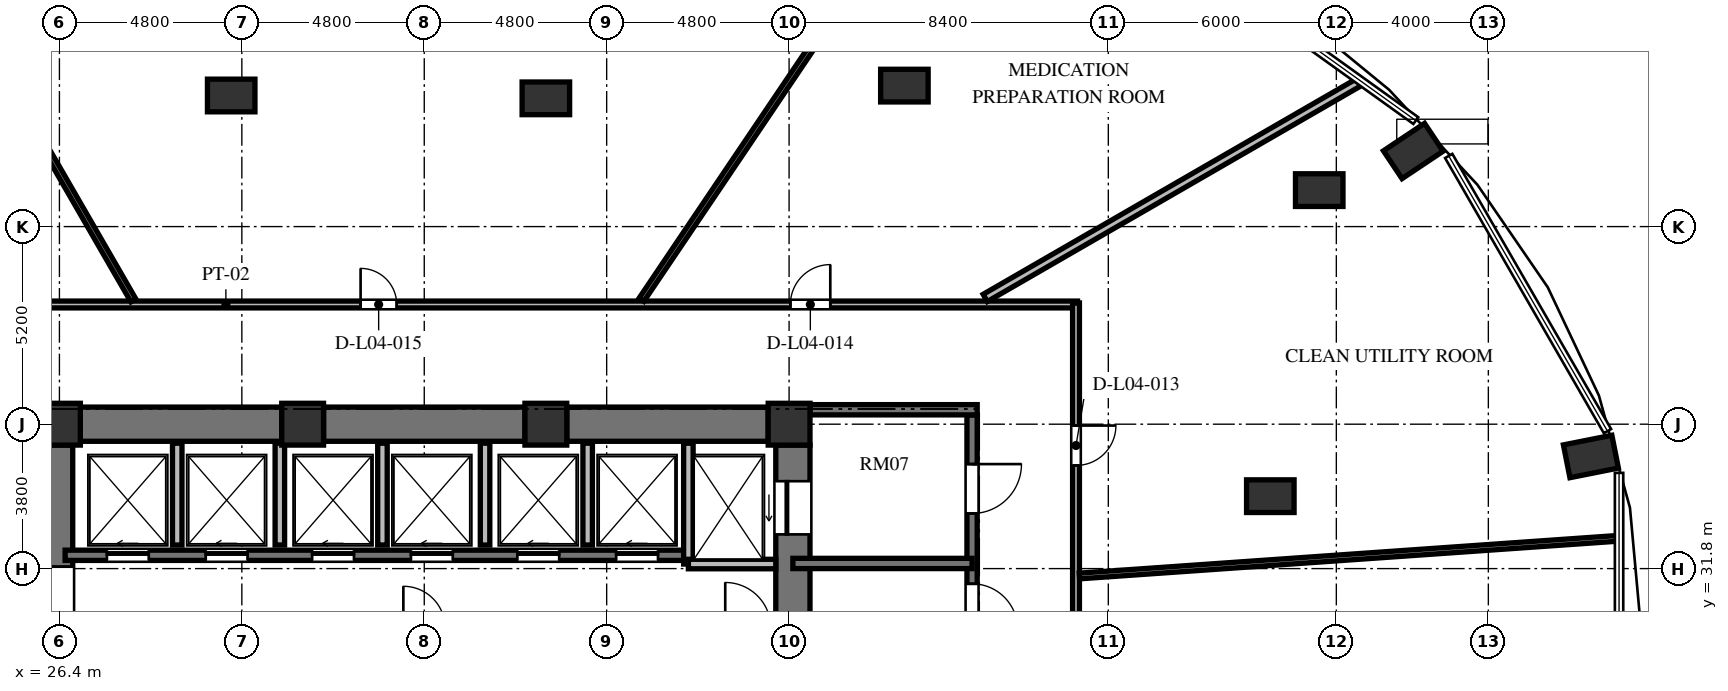
"""IFC4 building model, lengths in metres.
Left out: names, types, materials, properties, quantities, classifications, styles, units other than length and angle.
Written with IfcOpenShell. Run it as: python <this file> out.ifc"""

import sys

from ifc_helpers import new_model, si_unit, direction, frame, frame_2d, origin, origin_2d, place, context, subcontext, project, spatial, rectangle, extrude, element, fill, save


model = new_model("IFC4")
c1 = context("Model", 3, precision=1e-05, world=origin(), true_north=direction((0.0, 1.0)))
c2 = subcontext(c1, "Body", "Model", "MODEL_VIEW")
j1 = project(units=[si_unit("LENGTHUNIT", "METRE"), si_unit("PLANEANGLEUNIT", "RADIAN")], contexts=[c1])
p1 = place(None, origin())
s1 = spatial("IfcSite", under=j1, at=p1, CompositionType="ELEMENT")
p2 = place(p1, origin())
s2 = spatial("IfcBuilding", under=s1, at=p2, CompositionType="ELEMENT")
p3 = place(p2, frame((0.0, 0.0, 20.4)))
s3 = spatial("IfcBuildingStorey", under=s2, at=p3, CompositionType="ELEMENT", Elevation=20.4)
for number, where, z_axis, x_axis in (
    (1, (66.698, 34.75, 0.0), (0.0, 0.0, 1.0), (0.981, 0.195, 0.0)),
    (2, (62.025, 42.789, 0.0), (0.0, 0.0, 1.0), (0.831, 0.556, 0.0)),
):
    element("IfcColumn", number, at=place(p3, frame(where, z_axis=z_axis, x_axis=x_axis)), inside=s3, PredefinedType="COLUMN", context=c2, shape_type="SweptSolid", body=[
        extrude(rectangle(XDim=1.3, YDim=0.88, at=origin_2d()), origin(), (0.0, 0.0, 1.0), 4.8),
    ])
for number, where, z_axis, x_axis in (
    (3, (45.6, 35.6, 0.0), (0.0, 0.0, 1.0), (1.0, 0.0, 0.0)),
    (4, (39.2, 35.6, 0.0), (0.0, 0.0, 1.0), (1.0, 0.0, 0.0)),
    (5, (32.8, 35.6, 0.0), (0.0, 0.0, 1.0), (1.0, 0.0, 0.0)),
    (6, (26.4, 35.6, 0.0), (0.0, 0.0, 1.0), (1.0, 0.0, 0.0)),
):
    element("IfcColumn", number, at=place(p3, frame(where, z_axis=z_axis, x_axis=x_axis)), inside=s3, PredefinedType="COLUMN", context=c2, shape_type="SweptSolid", body=[
        extrude(rectangle(XDim=1.1, YDim=1.1, at=origin_2d()), origin(), (0.0, 0.0, 1.0), 4.8),
    ])
for number, where, z_axis, x_axis in (
    (7, (58.263, 33.706, 0.0), (0.0, 0.0, 1.0), (1.0, 0.0, 0.0)),
    (8, (59.55, 41.76, 0.0), (0.0, 0.0, 1.0), (1.0, 0.0, 0.0)),
    (9, (48.634, 44.51, 0.0), (0.0, 0.0, 1.0), (1.0, 0.0, 0.0)),
    (10, (39.2, 44.175, 0.0), (0.0, 0.0, 1.0), (1.0, 0.0, 0.0)),
    (11, (30.92, 44.25, 0.0), (0.0, 0.0, 1.0), (1.0, 0.0, 0.0)),
):
    element("IfcColumn", number, at=place(p3, frame(where, z_axis=z_axis, x_axis=x_axis)), inside=s3, PredefinedType="COLUMN", context=c2, shape_type="SweptSolid", body=[
        extrude(rectangle(XDim=1.25, YDim=0.86, at=origin_2d()), origin(), (0.0, 0.0, 1.0), 4.8),
    ])
p4 = place(p3, frame((26.3, 20.95, 0.0), z_axis=(0.0, 0.0, 1.0), x_axis=(0.0, 1.0, 0.0)))
e12 = element("IfcWall", 12, at=p4, inside=s3, PredefinedType="SHEAR", context=c2, shape_type="SweptSolid", body=[
    extrude(rectangle(XDim=14.1, YDim=0.9, at=frame_2d((7.05, 0.0))), origin(), (0.0, 0.0, 1.0), 4.8),
])
p5 = place(p4, frame((6.5, 0.0, 0.0)))
e13 = element("IfcOpeningElement", 13, at=p5, cuts=e12, PredefinedType="OPENING", context=c2, shape_type="SweptSolid", body=[
    extrude(rectangle(XDim=1.2, YDim=2.15, at=frame_2d((0.6, 1.075))), frame((0.0, 0.46, 0.0), z_axis=(0.0, -1.0, 0.0), x_axis=(1.0, 0.0, 0.0)), (0.0, 0.0, 1.0), 0.92),
])
p6 = place(p4, frame((9.6, 0.0, 0.0)))
e14 = element("IfcOpeningElement", 14, at=p6, cuts=e12, PredefinedType="OPENING", context=c2, shape_type="SweptSolid", body=[
    extrude(rectangle(XDim=1.3, YDim=2.2, at=frame_2d((0.65, 1.1))), frame((0.0, 0.46, 0.0), z_axis=(0.0, -1.0, 0.0), x_axis=(1.0, 0.0, 0.0)), (0.0, 0.0, 1.0), 0.92),
])
p7 = place(p4, frame((3.26, 0.0, 0.0)))
e15 = element("IfcOpeningElement", 15, at=p7, cuts=e12, PredefinedType="OPENING", context=c2, shape_type="SweptSolid", body=[
    extrude(rectangle(XDim=1.3, YDim=2.2, at=frame_2d((0.65, 1.1))), frame((0.0, 0.46, 0.0), z_axis=(0.0, -1.0, 0.0), x_axis=(1.0, 0.0, 0.0)), (0.0, 0.0, 1.0), 0.92),
])
p8 = place(p3, frame((45.7, 20.95, 0.0), z_axis=(0.0, 0.0, 1.0), x_axis=(0.0, 1.0, 0.0)))
e16 = element("IfcWall", 16, at=p8, inside=s3, PredefinedType="SHEAR", context=c2, shape_type="SweptSolid", body=[
    extrude(rectangle(XDim=14.1, YDim=0.9, at=frame_2d((7.05, 0.0))), origin(), (0.0, 0.0, 1.0), 4.8),
])
p9 = place(p8, frame((11.75, 0.0, 0.0)))
e17 = element("IfcOpeningElement", 17, at=p9, cuts=e16, PredefinedType="OPENING", context=c2, shape_type="SweptSolid", body=[
    extrude(rectangle(XDim=1.4, YDim=2.3, at=frame_2d((0.7, 1.15))), frame((0.0, 0.46, 0.0), z_axis=(0.0, -1.0, 0.0), x_axis=(1.0, 0.0, 0.0)), (0.0, 0.0, 1.0), 0.92),
])
p10 = place(p8, frame((0.95, 0.0, 0.0)))
e18 = element("IfcOpeningElement", 18, at=p10, cuts=e16, PredefinedType="OPENING", context=c2, shape_type="SweptSolid", body=[
    extrude(rectangle(XDim=1.4, YDim=2.3, at=frame_2d((0.7, 1.15))), frame((0.0, 0.46, 0.0), z_axis=(0.0, -1.0, 0.0), x_axis=(1.0, 0.0, 0.0)), (0.0, 0.0, 1.0), 0.92),
])
p11 = place(p3, frame((26.95, 35.6, 0.0), z_axis=(0.0, 0.0, 1.0), x_axis=(1.0, 0.0, 0.0)))
e19 = element("IfcWall", 19, at=p11, inside=s3, PredefinedType="SHEAR", context=c2, shape_type="SweptSolid", body=[
    extrude(rectangle(XDim=5.3, YDim=0.9, at=frame_2d((2.65, 0.0))), origin(), (0.0, 0.0, 1.0), 4.8),
])
p12 = place(p3, frame((33.35, 35.6, 0.0), z_axis=(0.0, 0.0, 1.0), x_axis=(1.0, 0.0, 0.0)))
e20 = element("IfcWall", 20, at=p12, inside=s3, PredefinedType="SHEAR", context=c2, shape_type="SweptSolid", body=[
    extrude(rectangle(XDim=5.3, YDim=0.9, at=frame_2d((2.65, 0.0))), origin(), (0.0, 0.0, 1.0), 4.8),
])
p13 = place(p3, frame((39.75, 35.6, 0.0), z_axis=(0.0, 0.0, 1.0), x_axis=(1.0, 0.0, 0.0)))
e21 = element("IfcWall", 21, at=p13, inside=s3, PredefinedType="SHEAR", context=c2, shape_type="SweptSolid", body=[
    extrude(rectangle(XDim=5.3, YDim=0.9, at=frame_2d((2.65, 0.0))), origin(), (0.0, 0.0, 1.0), 4.8),
])
p14 = place(p3, frame((26.55, 32.15, 0.0), z_axis=(0.0, 0.0, 1.0), x_axis=(1.0, 0.0, 0.0)))
e22 = element("IfcWall", 22, at=p14, inside=s3, PredefinedType="SHEAR", context=c2, shape_type="SweptSolid", body=[
    extrude(rectangle(XDim=16.4, YDim=0.27, at=frame_2d((8.2, 0.0))), origin(), (0.0, 0.0, 1.0), 4.8),
])
p15 = place(p14, frame((1.1, 0.0, 0.0)))
e23 = element("IfcOpeningElement", 23, at=p15, cuts=e22, PredefinedType="OPENING", context=c2, shape_type="SweptSolid", body=[
    extrude(rectangle(XDim=1.1, YDim=2.2, at=frame_2d((0.55, 1.1))), frame((0.0, 0.145, 0.0), z_axis=(0.0, -1.0, 0.0), x_axis=(1.0, 0.0, 0.0)), (0.0, 0.0, 1.0), 0.29),
])
p16 = place(p14, frame((3.7, 0.0, 0.0)))
e24 = element("IfcOpeningElement", 24, at=p16, cuts=e22, PredefinedType="OPENING", context=c2, shape_type="SweptSolid", body=[
    extrude(rectangle(XDim=1.1, YDim=2.2, at=frame_2d((0.55, 1.1))), frame((0.0, 0.145, 0.0), z_axis=(0.0, -1.0, 0.0), x_axis=(1.0, 0.0, 0.0)), (0.0, 0.0, 1.0), 0.29),
])
p17 = place(p14, frame((6.5, 0.0, 0.0)))
e25 = element("IfcOpeningElement", 25, at=p17, cuts=e22, PredefinedType="OPENING", context=c2, shape_type="SweptSolid", body=[
    extrude(rectangle(XDim=1.1, YDim=2.2, at=frame_2d((0.55, 1.1))), frame((0.0, 0.145, 0.0), z_axis=(0.0, -1.0, 0.0), x_axis=(1.0, 0.0, 0.0)), (0.0, 0.0, 1.0), 0.29),
])
p18 = place(p14, frame((9.1, 0.0, 0.0)))
e26 = element("IfcOpeningElement", 26, at=p18, cuts=e22, PredefinedType="OPENING", context=c2, shape_type="SweptSolid", body=[
    extrude(rectangle(XDim=1.1, YDim=2.2, at=frame_2d((0.55, 1.1))), frame((0.0, 0.145, 0.0), z_axis=(0.0, -1.0, 0.0), x_axis=(1.0, 0.0, 0.0)), (0.0, 0.0, 1.0), 0.29),
])
p19 = place(p14, frame((11.9, 0.0, 0.0)))
e27 = element("IfcOpeningElement", 27, at=p19, cuts=e22, PredefinedType="OPENING", context=c2, shape_type="SweptSolid", body=[
    extrude(rectangle(XDim=1.1, YDim=2.2, at=frame_2d((0.55, 1.1))), frame((0.0, 0.145, 0.0), z_axis=(0.0, -1.0, 0.0), x_axis=(1.0, 0.0, 0.0)), (0.0, 0.0, 1.0), 0.29),
])
p20 = place(p14, frame((14.5, 0.0, 0.0)))
e28 = element("IfcOpeningElement", 28, at=p20, cuts=e22, PredefinedType="OPENING", context=c2, shape_type="SweptSolid", body=[
    extrude(rectangle(XDim=1.1, YDim=2.2, at=frame_2d((0.55, 1.1))), frame((0.0, 0.145, 0.0), z_axis=(0.0, -1.0, 0.0), x_axis=(1.0, 0.0, 0.0)), (0.0, 0.0, 1.0), 0.29),
])
p21 = place(p3, frame((42.95, 31.92, 0.0), z_axis=(0.0, 0.0, 1.0), x_axis=(0.0, 1.0, 0.0)))
e29 = element("IfcWall", 29, at=p21, inside=s3, PredefinedType="SOLIDWALL", context=c2, shape_type="SweptSolid", body=[
    extrude(rectangle(XDim=3.18, YDim=0.25, at=frame_2d((1.59, 0.0))), origin(), (0.0, 0.0, 1.0), 4.58),
])
p22 = place(p3, frame((42.95, 31.92, 0.0), z_axis=(0.0, 0.0, 1.0), x_axis=(1.0, 0.0, 0.0)))
e30 = element("IfcWall", 30, at=p22, inside=s3, PredefinedType="SOLIDWALL", context=c2, shape_type="SweptSolid", body=[
    extrude(rectangle(XDim=2.3, YDim=0.25, at=frame_2d((1.15, 0.0))), origin(), (0.0, 0.0, 1.0), 4.58),
])
for number, where, z_axis, x_axis in (
    (31, (29.5, 32.42, 0.0), (0.0, 0.0, 1.0), (0.0, 1.0, 0.0)),
    (32, (32.2, 32.42, 0.0), (0.0, 0.0, 1.0), (0.0, 1.0, 0.0)),
    (33, (34.9, 32.42, 0.0), (0.0, 0.0, 1.0), (0.0, 1.0, 0.0)),
    (34, (37.6, 32.42, 0.0), (0.0, 0.0, 1.0), (0.0, 1.0, 0.0)),
    (35, (40.3, 32.42, 0.0), (0.0, 0.0, 1.0), (0.0, 1.0, 0.0)),
):
    element("IfcWall", number, at=place(p3, frame(where, z_axis=z_axis, x_axis=x_axis)), inside=s3, PredefinedType="SOLIDWALL", context=c2, shape_type="SweptSolid", body=[
        extrude(rectangle(XDim=2.68, YDim=0.25, at=frame_2d((1.34, 0.0))), origin(), (0.0, 0.0, 1.0), 4.58),
    ])
p23 = place(p3, frame((50.415, 35.845, 0.0), z_axis=(0.0, 0.0, 1.0), x_axis=(0.0, -1.0, 0.0)))
e36 = element("IfcWall", 36, at=p23, inside=s3, PredefinedType="SHEAR", context=c2, shape_type="SweptSolid", body=[
    extrude(rectangle(XDim=15.825, YDim=0.27, at=frame_2d((7.913, 0.0))), origin(), (0.0, 0.0, 1.0), 4.8),
])
p24 = place(p23, frame((4.445, 0.0, 0.0)))
e37 = element("IfcOpeningElement", 37, at=p24, cuts=e36, PredefinedType="OPENING", context=c2, shape_type="SweptSolid", body=[
    extrude(rectangle(XDim=1.2, YDim=2.15, at=frame_2d((0.6, 1.075))), frame((0.0, 0.145, 0.0), z_axis=(0.0, -1.0, 0.0), x_axis=(1.0, 0.0, 0.0)), (0.0, 0.0, 1.0), 0.29),
])
p25 = place(p23, frame((1.295, 0.0, 0.0)))
e38 = element("IfcOpeningElement", 38, at=p25, cuts=e36, PredefinedType="OPENING", context=c2, shape_type="SweptSolid", body=[
    extrude(rectangle(XDim=1.3, YDim=2.2, at=frame_2d((0.65, 1.1))), frame((0.0, 0.145, 0.0), z_axis=(0.0, -1.0, 0.0), x_axis=(1.0, 0.0, 0.0)), (0.0, 0.0, 1.0), 0.29),
])
p26 = place(p23, frame((13.095, 0.0, 0.0)))
e39 = element("IfcOpeningElement", 39, at=p26, cuts=e36, PredefinedType="OPENING", context=c2, shape_type="SweptSolid", body=[
    extrude(rectangle(XDim=1.3, YDim=2.2, at=frame_2d((0.65, 1.1))), frame((0.0, 0.145, 0.0), z_axis=(0.0, -1.0, 0.0), x_axis=(1.0, 0.0, 0.0)), (0.0, 0.0, 1.0), 0.29),
])
p27 = place(p3, frame((46.15, 35.98, 0.0), z_axis=(0.0, 0.0, 1.0), x_axis=(1.0, 0.0, 0.0)))
e40 = element("IfcWall", 40, at=p27, inside=s3, PredefinedType="SHEAR", context=c2, shape_type="SweptSolid", body=[
    extrude(rectangle(XDim=4.4, YDim=0.27, at=frame_2d((2.2, 0.0))), origin(), (0.0, 0.0, 1.0), 4.8),
])
p28 = place(p3, frame((45.7, 31.935, 0.0), z_axis=(0.0, 0.0, 1.0), x_axis=(1.0, 0.0, 0.0)))
e41 = element("IfcWall", 41, at=p28, inside=s3, PredefinedType="SHEAR", context=c2, shape_type="SweptSolid", body=[
    extrude(rectangle(XDim=4.715, YDim=0.27, at=frame_2d((2.357, 0.0))), origin(), (0.0, 0.0, 1.0), 4.8),
])
p29 = place(p3, frame((23.31, 38.75, 0.0), z_axis=(0.0, 0.0, 1.0), x_axis=(1.0, 0.0, 0.0)))
e42 = element("IfcWall", 42, at=p29, inside=s3, PredefinedType="PARTITIONING", context=c2, shape_type="SweptSolid", body=[
    extrude(rectangle(XDim=29.88, YDim=0.18, at=frame_2d((14.94, 0.0))), origin(), (0.0, 0.0, 1.0), 4.58),
])
p30 = place(p29, frame((22.324, 0.0, 0.0)))
e43 = element("IfcOpeningElement", 43, at=p30, cuts=e42, PredefinedType="OPENING", context=c2, shape_type="SweptSolid", body=[
    extrude(rectangle(XDim=1.05, YDim=2.15, at=frame_2d((0.525, 1.075))), frame((0.0, 0.1, 0.0), z_axis=(0.0, -1.0, 0.0), x_axis=(1.0, 0.0, 0.0)), (0.0, 0.0, 1.0), 0.2),
])
p31 = place(p29, frame((11.015, 0.0, 0.0)))
e44 = element("IfcOpeningElement", 44, at=p31, cuts=e42, PredefinedType="OPENING", context=c2, shape_type="SweptSolid", body=[
    extrude(rectangle(XDim=0.95, YDim=2.1, at=frame_2d((0.475, 1.05))), frame((0.0, 0.1, 0.0), z_axis=(0.0, -1.0, 0.0), x_axis=(1.0, 0.0, 0.0)), (0.0, 0.0, 1.0), 0.2),
])
p32 = place(p3, frame((53.15, 38.79, 0.0), z_axis=(0.0, 0.0, 1.0), x_axis=(0.0, -1.0, 0.0)))
e45 = element("IfcWall", 45, at=p32, inside=s3, PredefinedType="PARTITIONING", context=c2, shape_type="SweptSolid", body=[
    extrude(rectangle(XDim=9.43, YDim=0.18, at=frame_2d((4.715, 0.0))), origin(), (0.0, 0.0, 1.0), 4.265),
])
p33 = place(p32, frame((3.226, 0.0, 0.0)))
e46 = element("IfcOpeningElement", 46, at=p33, cuts=e45, PredefinedType="OPENING", context=c2, shape_type="SweptSolid", body=[
    extrude(rectangle(XDim=1.05, YDim=2.15, at=frame_2d((0.525, 1.075))), frame((0.0, 0.1, 0.0), z_axis=(0.0, -1.0, 0.0), x_axis=(1.0, 0.0, 0.0)), (0.0, 0.0, 1.0), 0.2),
])
p34 = place(p3, frame((53.24, 31.605, 0.0), z_axis=(0.0, 0.0, 1.0), x_axis=(0.997563398333, 0.069765796107, 0.0)))
e47 = element("IfcWall", 47, at=p34, inside=s3, PredefinedType="PARTITIONING", context=c2, shape_type="SweptSolid", body=[
    extrude(rectangle(XDim=14.232, YDim=0.15, at=frame_2d((7.116, 0.0))), origin(), (0.0, 0.0, 1.0), 4.58),
])
p35 = place(p3, frame((50.761, 38.923, 0.0), z_axis=(0.0, 0.0, 1.0), x_axis=(0.866026972346, 0.499997283162, 0.0)))
e48 = element("IfcWall", 48, at=p35, inside=s3, PredefinedType="PARTITIONING", context=c2, shape_type="SweptSolid", body=[
    extrude(rectangle(XDim=11.406, YDim=0.22, at=frame_2d((5.703, 0.0))), origin(), (0.0, 0.0, 1.0), 4.58),
])
p36 = place(p3, frame((41.717, 38.875, 0.0), z_axis=(0.0, 0.0, 1.0), x_axis=(0.559191016445, 0.829038845367, 0.0)))
e49 = element("IfcWall", 49, at=p36, inside=s3, PredefinedType="PARTITIONING", context=c2, shape_type="SweptSolid", body=[
    extrude(rectangle(XDim=14.314, YDim=0.15, at=frame_2d((7.157, 0.0))), origin(), (0.0, 0.0, 1.0), 4.58),
])
p37 = place(p3, frame((28.346, 38.857, 0.0), z_axis=(0.0, 0.0, 1.0), x_axis=(-0.500008731563, 0.866020362555, 0.0)))
e50 = element("IfcWall", 50, at=p37, inside=s3, PredefinedType="PARTITIONING", context=c2, shape_type="SweptSolid", body=[
    extrude(rectangle(XDim=8.76, YDim=0.15, at=frame_2d((4.38, 0.0))), origin(), (0.0, 0.0, 1.0), 4.58),
])
p38 = place(p6, origin())
e51 = element("IfcDoor", 51, at=p38, inside=s3, OperationType="SINGLE_SWING_RIGHT", PredefinedType="DOOR", context=c2, shape_type="SweptSolid", body=[
    extrude(rectangle(XDim=1.3, YDim=2.2, at=frame_2d((0.65, 1.1))), frame((0.0, 0.025, 0.0), z_axis=(0.0, -1.0, 0.0), x_axis=(1.0, 0.0, 0.0)), (0.0, 0.0, 1.0), 0.05),
])
fill(e14, e51)
p39 = place(p15, origin())
e52 = element("IfcDoor", 52, at=p39, inside=s3, OperationType="SLIDING_TO_LEFT", PredefinedType="DOOR", context=c2, shape_type="SweptSolid", body=[
    extrude(rectangle(XDim=1.1, YDim=2.2, at=frame_2d((0.55, 1.1))), frame((0.0, 0.025, 0.0), z_axis=(0.0, -1.0, 0.0), x_axis=(1.0, 0.0, 0.0)), (0.0, 0.0, 1.0), 0.05),
])
fill(e23, e52)
p40 = place(p16, origin())
e53 = element("IfcDoor", 53, at=p40, inside=s3, OperationType="SLIDING_TO_LEFT", PredefinedType="DOOR", context=c2, shape_type="SweptSolid", body=[
    extrude(rectangle(XDim=1.1, YDim=2.2, at=frame_2d((0.55, 1.1))), frame((0.0, 0.025, 0.0), z_axis=(0.0, -1.0, 0.0), x_axis=(1.0, 0.0, 0.0)), (0.0, 0.0, 1.0), 0.05),
])
fill(e24, e53)
p41 = place(p17, origin())
e54 = element("IfcDoor", 54, at=p41, inside=s3, OperationType="SLIDING_TO_LEFT", PredefinedType="DOOR", context=c2, shape_type="SweptSolid", body=[
    extrude(rectangle(XDim=1.1, YDim=2.2, at=frame_2d((0.55, 1.1))), frame((0.0, 0.025, 0.0), z_axis=(0.0, -1.0, 0.0), x_axis=(1.0, 0.0, 0.0)), (0.0, 0.0, 1.0), 0.05),
])
fill(e25, e54)
p42 = place(p18, origin())
e55 = element("IfcDoor", 55, at=p42, inside=s3, OperationType="SLIDING_TO_LEFT", PredefinedType="DOOR", context=c2, shape_type="SweptSolid", body=[
    extrude(rectangle(XDim=1.1, YDim=2.2, at=frame_2d((0.55, 1.1))), frame((0.0, 0.025, 0.0), z_axis=(0.0, -1.0, 0.0), x_axis=(1.0, 0.0, 0.0)), (0.0, 0.0, 1.0), 0.05),
])
fill(e26, e55)
p43 = place(p19, origin())
e56 = element("IfcDoor", 56, at=p43, inside=s3, OperationType="SLIDING_TO_LEFT", PredefinedType="DOOR", context=c2, shape_type="SweptSolid", body=[
    extrude(rectangle(XDim=1.1, YDim=2.2, at=frame_2d((0.55, 1.1))), frame((0.0, 0.025, 0.0), z_axis=(0.0, -1.0, 0.0), x_axis=(1.0, 0.0, 0.0)), (0.0, 0.0, 1.0), 0.05),
])
fill(e27, e56)
p44 = place(p20, origin())
e57 = element("IfcDoor", 57, at=p44, inside=s3, OperationType="SLIDING_TO_LEFT", PredefinedType="DOOR", context=c2, shape_type="SweptSolid", body=[
    extrude(rectangle(XDim=1.1, YDim=2.2, at=frame_2d((0.55, 1.1))), frame((0.0, 0.025, 0.0), z_axis=(0.0, -1.0, 0.0), x_axis=(1.0, 0.0, 0.0)), (0.0, 0.0, 1.0), 0.05),
])
fill(e28, e57)
p45 = place(p9, origin())
e58 = element("IfcDoor", 58, at=p45, inside=s3, OperationType="SLIDING_TO_LEFT", PredefinedType="DOOR", context=c2, shape_type="SweptSolid", body=[
    extrude(rectangle(XDim=1.4, YDim=2.3, at=frame_2d((0.7, 1.15))), frame((0.0, 0.025, 0.0), z_axis=(0.0, -1.0, 0.0), x_axis=(1.0, 0.0, 0.0)), (0.0, 0.0, 1.0), 0.05),
])
fill(e17, e58)
p46 = place(p24, origin())
e59 = element("IfcDoor", 59, at=p46, inside=s3, OperationType="SINGLE_SWING_RIGHT", PredefinedType="DOOR", context=c2, shape_type="SweptSolid", body=[
    extrude(rectangle(XDim=1.2, YDim=2.15, at=frame_2d((0.6, 1.075))), frame((0.0, 0.025, 0.0), z_axis=(0.0, -1.0, 0.0), x_axis=(1.0, 0.0, 0.0)), (0.0, 0.0, 1.0), 0.05),
])
fill(e37, e59)
p47 = place(p25, origin())
e60 = element("IfcDoor", 60, at=p47, inside=s3, OperationType="SINGLE_SWING_LEFT", PredefinedType="DOOR", context=c2, shape_type="SweptSolid", body=[
    extrude(rectangle(XDim=1.3, YDim=2.2, at=frame_2d((0.65, 1.1))), frame((0.0, 0.025, 0.0), z_axis=(0.0, -1.0, 0.0), x_axis=(1.0, 0.0, 0.0)), (0.0, 0.0, 1.0), 0.05),
])
fill(e38, e60)
p48 = place(p33, origin())
e61 = element("IfcDoor", 61, at=p48, inside=s3, OperationType="SINGLE_SWING_LEFT", PredefinedType="DOOR", context=c2, shape_type="SweptSolid", body=[
    extrude(rectangle(XDim=1.05, YDim=2.15, at=frame_2d((0.525, 1.075))), frame((0.0, 0.025, 0.0), z_axis=(0.0, -1.0, 0.0), x_axis=(1.0, 0.0, 0.0)), (0.0, 0.0, 1.0), 0.05),
])
fill(e46, e61)
p49 = place(p30, origin())
e62 = element("IfcDoor", 62, at=p49, inside=s3, OperationType="SINGLE_SWING_RIGHT", PredefinedType="DOOR", context=c2, shape_type="SweptSolid", body=[
    extrude(rectangle(XDim=1.05, YDim=2.15, at=frame_2d((0.525, 1.075))), frame((0.0, 0.025, 0.0), z_axis=(0.0, -1.0, 0.0), x_axis=(1.0, 0.0, 0.0)), (0.0, 0.0, 1.0), 0.05),
])
fill(e43, e62)
p50 = place(p31, origin())
e63 = element("IfcDoor", 63, at=p50, inside=s3, OperationType="SINGLE_SWING_LEFT", PredefinedType="DOOR", context=c2, shape_type="SweptSolid", body=[
    extrude(rectangle(XDim=0.95, YDim=2.1, at=frame_2d((0.475, 1.05))), frame((0.0, 0.025, 0.0), z_axis=(0.0, -1.0, 0.0), x_axis=(1.0, 0.0, 0.0)), (0.0, 0.0, 1.0), 0.05),
])
fill(e44, e63)
save(model, sys.argv[1])
